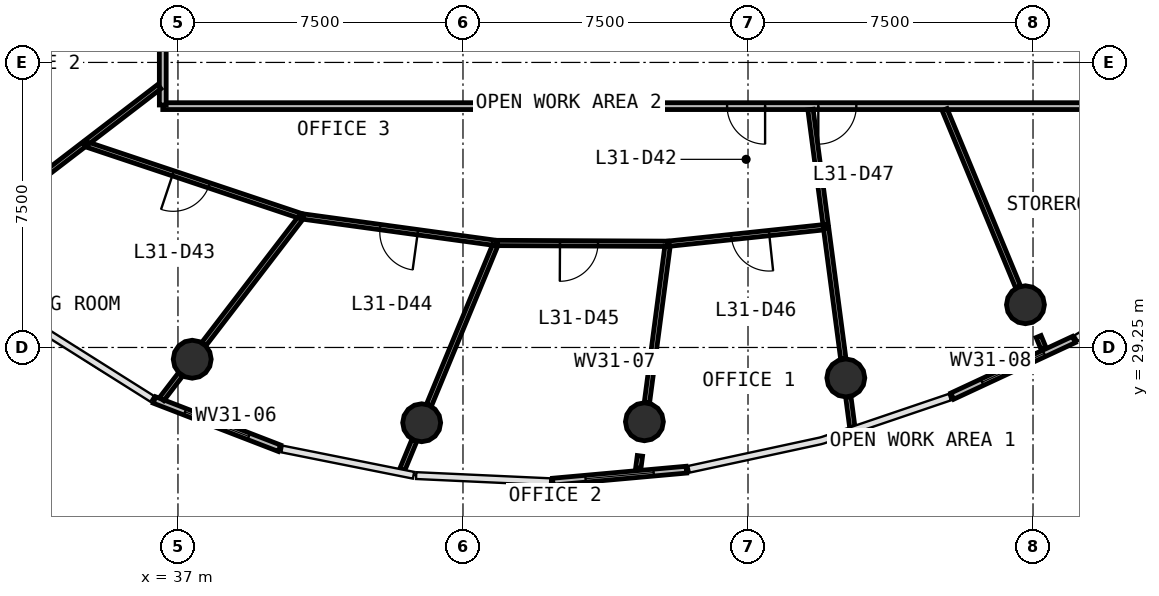
"""IFC4 building model, lengths in metres.
Left out: names, types, materials, properties, quantities, classifications, styles, units other than length and angle.
Written with IfcOpenShell. Run it as: python <this file> out.ifc"""

import sys

from ifc_helpers import new_model, si_unit, direction, frame, frame_2d, origin, origin_2d, place, context, subcontext, project, spatial, rectangle, circle, extrude, source, transform, mapped, element, fill, save


model = new_model("IFC4")
c1 = context("Model", 3, precision=1e-05, world=origin(), true_north=direction((0.0, 1.0)))
c2 = subcontext(c1, "Body", "Model", "MODEL_VIEW")
j1 = project(units=[si_unit("LENGTHUNIT", "METRE"), si_unit("PLANEANGLEUNIT", "RADIAN")], contexts=[c1])
p1 = place(None, origin())
s1 = spatial("IfcSite", under=j1, at=p1, CompositionType="ELEMENT")
p2 = place(p1, origin())
s2 = spatial("IfcBuilding", under=s1, at=p2, CompositionType="ELEMENT")
p3 = place(p2, frame((0.0, 0.0, 133.1)))
s3 = spatial("IfcBuildingStorey", under=s2, at=p3, CompositionType="ELEMENT", Elevation=133.1)
m1 = source(origin(), c2, "Body", "SweptSolid", [
    extrude(circle(Radius=0.5, at=origin_2d()), origin(), (0.0, 0.0, 1.0), 4.22),
])
for number, where, z_axis, x_axis in (
    (1, (37.375, 28.94, -0.32), (0.0, 0.0, 1.0), (1.0, 0.0, 0.0)),
    (2, (43.413, 27.269, -0.32), (0.0, 0.0, 1.0), (1.0, 0.0, 0.0)),
    (3, (49.274, 27.295, -0.32), (0.0, 0.0, 1.0), (1.0, 0.0, 0.0)),
    (4, (54.574, 28.449, -0.32), (0.0, 0.0, 1.0), (1.0, 0.0, 0.0)),
    (5, (59.301, 30.374, -0.32), (0.0, 0.0, 1.0), (1.0, 0.0, 0.0)),
):
    element("IfcColumn", number, at=place(p3, frame(where, z_axis=z_axis, x_axis=x_axis)), inside=s3, PredefinedType="COLUMN", context=c2, shape_type="MappedRepresentation", body=[
        mapped(m1, transform((0.0, 0.0, 0.0), scale=1.0)),
    ])
p4 = place(p3, frame((36.381, 27.869, 0.0), z_axis=(0.0, 0.0, 1.0), x_axis=(0.932854177958, -0.36025419174, 0.0)))
e6 = element("IfcWall", 6, at=p4, inside=s3, PredefinedType="STANDARD", context=c2, shape_type="SweptSolid", body=[
    extrude(rectangle(XDim=3.527, YDim=0.18, at=frame_2d((1.764, 0.0))), origin(), (0.0, 0.0, 1.0), 3.328),
])
p5 = place(p4, frame((0.864, 0.0, 0.9)))
e7 = element("IfcOpeningElement", 7, at=p5, cuts=e6, PredefinedType="OPENING", context=c2, shape_type="SweptSolid", body=[
    extrude(rectangle(XDim=1.8, YDim=2.1, at=frame_2d((0.9, 1.05))), frame((0.0, 0.1, 0.0), z_axis=(0.0, -1.0, 0.0), x_axis=(1.0, 0.0, 0.0)), (0.0, 0.0, 1.0), 0.2),
])
p6 = place(p3, frame((46.863, 25.719, 0.0), z_axis=(0.0, 0.0, 1.0), x_axis=(0.995987333175, 0.089494313529, 0.0)))
e8 = element("IfcWall", 8, at=p6, inside=s3, PredefinedType="STANDARD", context=c2, shape_type="SweptSolid", body=[
    extrude(rectangle(XDim=3.53, YDim=0.18, at=frame_2d((1.765, 0.0))), origin(), (0.0, 0.0, 1.0), 3.328),
])
p7 = place(p6, frame((0.865, 0.0, 0.9)))
e9 = element("IfcOpeningElement", 9, at=p7, cuts=e8, PredefinedType="OPENING", context=c2, shape_type="SweptSolid", body=[
    extrude(rectangle(XDim=1.8, YDim=2.1, at=frame_2d((0.9, 1.05))), frame((0.0, 0.1, 0.0), z_axis=(0.0, -1.0, 0.0), x_axis=(1.0, 0.0, 0.0)), (0.0, 0.0, 1.0), 0.2),
])
p8 = place(p3, frame((57.375, 27.969, 0.0), z_axis=(0.0, 0.0, 1.0), x_axis=(0.906604865337, 0.421980589776, 0.0)))
e10 = element("IfcWall", 10, at=p8, inside=s3, PredefinedType="STANDARD", context=c2, shape_type="SweptSolid", body=[
    extrude(rectangle(XDim=3.531, YDim=0.18, at=frame_2d((1.766, 0.0))), origin(), (0.0, 0.0, 1.0), 3.58),
])
p9 = place(p8, frame((0.865, 0.0, 0.9)))
e11 = element("IfcOpeningElement", 11, at=p9, cuts=e10, PredefinedType="OPENING", context=c2, shape_type="SweptSolid", body=[
    extrude(rectangle(XDim=1.8, YDim=2.1, at=frame_2d((0.9, 1.05))), frame((0.0, 0.1, 0.0), z_axis=(0.0, -1.0, 0.0), x_axis=(1.0, 0.0, 0.0)), (0.0, 0.0, 1.0), 0.2),
])
p10 = place(p3, frame((64.324, 26.292, 0.0), z_axis=(0.0, 0.0, 1.0), x_axis=(-0.895150902045, -0.445763235998, 0.0)))
e12 = element("IfcWall", 12, at=p10, inside=s3, PredefinedType="PARAPET", context=c2, shape_type="SweptSolid", body=[
    extrude(rectangle(XDim=5.86, YDim=0.2, at=frame_2d((2.93, 0.0))), origin(), (0.0, 0.0, 1.0), 1.1),
])
p11 = place(p3, frame((67.4, 35.6, 0.0), z_axis=(0.0, 0.0, 1.0), x_axis=(-1.0, 0.0, 0.0)))
e13 = element("IfcWall", 13, at=p11, inside=s3, PredefinedType="PARTITIONING", context=c2, shape_type="SweptSolid", body=[
    extrude(rectangle(XDim=30.8, YDim=0.18, at=frame_2d((15.4, 0.0))), origin(), (0.0, 0.0, 1.0), 2.88),
])
p12 = place(p11, frame((14.95, 0.0, 0.0)))
e14 = element("IfcOpeningElement", 14, at=p12, cuts=e13, PredefinedType="OPENING", context=c2, shape_type="SweptSolid", body=[
    extrude(rectangle(XDim=1.0, YDim=2.1, at=frame_2d((0.5, 1.05))), frame((0.0, 0.1, 0.0), z_axis=(0.0, -1.0, 0.0), x_axis=(1.0, 0.0, 0.0)), (0.0, 0.0, 1.0), 0.2),
])
p13 = place(p11, frame((12.55, 0.0, 0.0)))
e15 = element("IfcOpeningElement", 15, at=p13, cuts=e13, PredefinedType="OPENING", context=c2, shape_type="SweptSolid", body=[
    extrude(rectangle(XDim=1.0, YDim=2.1, at=frame_2d((0.5, 1.05))), frame((0.0, 0.1, 0.0), z_axis=(0.0, -1.0, 0.0), x_axis=(1.0, 0.0, 0.0)), (0.0, 0.0, 1.0), 0.2),
])
p14 = place(p3, frame((36.6, 35.63, 0.0), z_axis=(0.0, 0.0, 1.0), x_axis=(0.0, 1.0, 0.0)))
e16 = element("IfcWall", 16, at=p14, inside=s3, PredefinedType="PARTITIONING", context=c2, shape_type="SweptSolid", body=[
    extrude(rectangle(XDim=23.638, YDim=0.18, at=frame_2d((11.819, 0.0))), origin(), (0.0, 0.0, 1.0), 2.88),
])
p15 = place(p14, frame((11.387, 0.0, 0.0)))
e17 = element("IfcOpeningElement", 17, at=p15, cuts=e16, PredefinedType="OPENING", context=c2, shape_type="SweptSolid", body=[
    extrude(rectangle(XDim=1.0, YDim=2.1, at=frame_2d((0.5, 1.05))), frame((0.0, 0.1, 0.0), z_axis=(0.0, -1.0, 0.0), x_axis=(1.0, 0.0, 0.0)), (0.0, 0.0, 1.0), 0.2),
])
p16 = place(p14, frame((8.988, 0.0, 0.0)))
e18 = element("IfcOpeningElement", 18, at=p16, cuts=e16, PredefinedType="OPENING", context=c2, shape_type="SweptSolid", body=[
    extrude(rectangle(XDim=1.0, YDim=2.1, at=frame_2d((0.5, 1.05))), frame((0.0, 0.1, 0.0), z_axis=(0.0, -1.0, 0.0), x_axis=(1.0, 0.0, 0.0)), (0.0, 0.0, 1.0), 0.2),
])
p17 = place(p14, frame((4.587, 0.0, 0.0)))
e19 = element("IfcOpeningElement", 19, at=p17, cuts=e16, PredefinedType="OPENING", context=c2, shape_type="SweptSolid", body=[
    extrude(rectangle(XDim=1.0, YDim=2.1, at=frame_2d((0.5, 1.05))), frame((0.0, 0.1, 0.0), z_axis=(0.0, -1.0, 0.0), x_axis=(1.0, 0.0, 0.0)), (0.0, 0.0, 1.0), 0.2),
])
p18 = place(p3, frame((40.26, 32.7, 0.0), z_axis=(0.0, 0.0, 1.0), x_axis=(-0.94841131313, 0.317042554126, 0.0)))
e20 = element("IfcWall", 20, at=p18, inside=s3, PredefinedType="PARTITIONING", context=c2, shape_type="SweptSolid", body=[
    extrude(rectangle(XDim=6.022, YDim=0.14, at=frame_2d((3.011, 0.0))), origin(), (0.0, 0.0, 1.0), 2.88),
])
p19 = place(p18, frame((2.572, 0.0, 0.0)))
e21 = element("IfcOpeningElement", 21, at=p19, cuts=e20, PredefinedType="OPENING", context=c2, shape_type="SweptSolid", body=[
    extrude(rectangle(XDim=1.0, YDim=2.1, at=frame_2d((0.5, 1.05))), frame((0.0, 0.08, 0.0), z_axis=(0.0, -1.0, 0.0), x_axis=(1.0, 0.0, 0.0)), (0.0, 0.0, 1.0), 0.16),
])
p20 = place(p3, frame((45.372, 32.0, 0.0), z_axis=(0.0, 0.0, 1.0), x_axis=(-0.990747746033, 0.135716261849, 0.0)))
e22 = element("IfcWall", 22, at=p20, inside=s3, PredefinedType="PARTITIONING", context=c2, shape_type="SweptSolid", body=[
    extrude(rectangle(XDim=5.13, YDim=0.14, at=frame_2d((2.565, 0.0))), origin(), (0.0, 0.0, 1.0), 2.88),
])
p21 = place(p20, frame((2.08, 0.0, 0.0)))
e23 = element("IfcOpeningElement", 23, at=p21, cuts=e22, PredefinedType="OPENING", context=c2, shape_type="SweptSolid", body=[
    extrude(rectangle(XDim=1.0, YDim=2.1, at=frame_2d((0.5, 1.05))), frame((0.0, 0.08, 0.0), z_axis=(0.0, -1.0, 0.0), x_axis=(1.0, 0.0, 0.0)), (0.0, 0.0, 1.0), 0.16),
])
p22 = place(p3, frame((57.174, 35.51, 0.0), z_axis=(0.0, 0.0, 1.0), x_axis=(0.382690261322, -0.923876703835, 0.0)))
e24 = element("IfcWall", 24, at=p22, inside=s3, PredefinedType="PARTITIONING", context=c2, shape_type="SweptSolid", body=[
    extrude(rectangle(XDim=5.054, YDim=0.14, at=frame_2d((2.527, 0.0))), origin(), (0.0, 0.0, 1.0), 2.88),
])
p23 = place(p3, frame((45.345, 31.933, 0.0), z_axis=(0.0, 0.0, 1.0), x_axis=(-0.382695113469, -0.923874693953, 0.0)))
e25 = element("IfcWall", 25, at=p23, inside=s3, PredefinedType="PARTITIONING", context=c2, shape_type="SweptSolid", body=[
    extrude(rectangle(XDim=4.543, YDim=0.14, at=frame_2d((2.271, 0.0))), origin(), (0.0, 0.0, 1.0), 2.88),
])
p24 = place(p3, frame((49.891, 31.978, 0.0), z_axis=(0.0, 0.0, 1.0), x_axis=(-0.999988802497, 0.004732322988, 0.0)))
e26 = element("IfcWall", 26, at=p24, inside=s3, PredefinedType="PARTITIONING", context=c2, shape_type="SweptSolid", body=[
    extrude(rectangle(XDim=4.488, YDim=0.14, at=frame_2d((2.244, 0.0))), origin(), (0.0, 0.0, 1.0), 2.88),
])
p25 = place(p24, frame((1.838, 0.0, 0.0)))
e27 = element("IfcOpeningElement", 27, at=p25, cuts=e26, PredefinedType="OPENING", context=c2, shape_type="SweptSolid", body=[
    extrude(rectangle(XDim=1.0, YDim=2.1, at=frame_2d((0.5, 1.05))), frame((0.0, 0.08, 0.0), z_axis=(0.0, -1.0, 0.0), x_axis=(1.0, 0.0, 0.0)), (0.0, 0.0, 1.0), 0.16),
])
p26 = place(p3, frame((40.215, 32.641, 0.0), z_axis=(0.0, 0.0, 1.0), x_axis=(-0.608771541946, -0.793345580259, 0.0)))
e28 = element("IfcWall", 28, at=p26, inside=s3, PredefinedType="PARTITIONING", context=c2, shape_type="SweptSolid", body=[
    extrude(rectangle(XDim=4.16, YDim=0.14, at=frame_2d((2.08, 0.0))), origin(), (0.0, 0.0, 1.0), 2.88),
])
p27 = place(p3, frame((49.882, 31.908, 0.0), z_axis=(0.0, 0.0, 1.0), x_axis=(-0.130586952739, -0.991436860206, 0.0)))
e29 = element("IfcWall", 29, at=p27, inside=s3, PredefinedType="PARTITIONING", context=c2, shape_type="SweptSolid", body=[
    extrude(rectangle(XDim=4.149, YDim=0.14, at=frame_2d((2.074, 0.0))), origin(), (0.0, 0.0, 1.0), 2.88),
])
p28 = place(p3, frame((54.051, 32.419, 0.0), z_axis=(0.0, 0.0, 1.0), x_axis=(-0.994419782511, -0.105495479291, 0.0)))
e30 = element("IfcWall", 30, at=p28, inside=s3, PredefinedType="PARTITIONING", context=c2, shape_type="SweptSolid", body=[
    extrude(rectangle(XDim=4.154, YDim=0.14, at=frame_2d((2.077, 0.0))), origin(), (0.0, 0.0, 1.0), 2.88),
])
p29 = place(p28, frame((1.504, 0.0, 0.0)))
e31 = element("IfcOpeningElement", 31, at=p29, cuts=e30, PredefinedType="OPENING", context=c2, shape_type="SweptSolid", body=[
    extrude(rectangle(XDim=1.0, YDim=2.1, at=frame_2d((0.5, 1.05))), frame((0.0, 0.08, 0.0), z_axis=(0.0, -1.0, 0.0), x_axis=(1.0, 0.0, 0.0)), (0.0, 0.0, 1.0), 0.16),
])
p30 = place(p3, frame((54.055, 32.39, 0.0), z_axis=(0.0, 0.0, 1.0), x_axis=(0.130481806014, -0.991450703918, 0.0)))
e32 = element("IfcWall", 32, at=p30, inside=s3, PredefinedType="PARTITIONING", context=c2, shape_type="SweptSolid", body=[
    extrude(rectangle(XDim=3.471, YDim=0.14, at=frame_2d((1.735, 0.0))), origin(), (0.0, 0.0, 1.0), 2.88),
])
p31 = place(p3, frame((53.644, 35.51, 0.0), z_axis=(0.0, 0.0, 1.0), x_axis=(0.130520836254, -0.991445566485, 0.0)))
e33 = element("IfcWall", 33, at=p31, inside=s3, PredefinedType="PARTITIONING", context=c2, shape_type="SweptSolid", body=[
    extrude(rectangle(XDim=3.047, YDim=0.14, at=frame_2d((1.523, 0.0))), origin(), (0.0, 0.0, 1.0), 2.88),
])
p32 = place(p3, frame((36.51, 36.114, 0.0), z_axis=(0.0, 0.0, 1.0), x_axis=(-0.793375926436, -0.608731993041, 0.0)))
e34 = element("IfcWall", 34, at=p32, inside=s3, PredefinedType="PARTITIONING", context=c2, shape_type="SweptSolid", body=[
    extrude(rectangle(XDim=2.388, YDim=0.14, at=frame_2d((1.194, 0.0))), origin(), (0.0, 0.0, 1.0), 2.88),
])
p33 = place(p3, frame((34.525, 34.591, 0.0), z_axis=(0.0, 0.0, 1.0), x_axis=(-0.793361748198, -0.608750471455, 0.0)))
e35 = element("IfcWall", 35, at=p33, inside=s3, PredefinedType="PARTITIONING", context=c2, shape_type="SweptSolid", body=[
    extrude(rectangle(XDim=2.458, YDim=0.14, at=frame_2d((1.229, 0.0))), origin(), (0.0, 0.0, 1.0), 2.88),
])
p34 = place(p3, frame((43.22, 26.802, 0.0), z_axis=(0.0, 0.0, 1.0), x_axis=(-0.382550591972, -0.923934545615, 0.0)))
e36 = element("IfcWall", 36, at=p34, inside=s3, PredefinedType="PARTITIONING", context=c2, shape_type="SweptSolid", body=[
    extrude(rectangle(XDim=0.832, YDim=0.14, at=frame_2d((0.416, 0.0))), origin(), (0.0, 0.0, 1.0), 2.88),
])
p35 = place(p3, frame((49.156, 26.398, 0.0), z_axis=(0.0, 0.0, 1.0), x_axis=(-0.130240292618, -0.991482458836, 0.0)))
e37 = element("IfcWall", 37, at=p35, inside=s3, PredefinedType="PARTITIONING", context=c2, shape_type="SweptSolid", body=[
    extrude(rectangle(XDim=0.324, YDim=0.14, at=frame_2d((0.162, 0.0))), origin(), (0.0, 0.0, 1.0), 2.88),
])
p36 = place(p3, frame((37.068, 28.54, 0.0), z_axis=(0.0, 0.0, 1.0), x_axis=(-0.608796827704, -0.793326176663, 0.0)))
e38 = element("IfcWall", 38, at=p36, inside=s3, PredefinedType="PARTITIONING", context=c2, shape_type="SweptSolid", body=[
    extrude(rectangle(XDim=0.814, YDim=0.14, at=frame_2d((0.407, 0.0))), origin(), (0.0, 0.0, 1.0), 2.88),
])
p37 = place(p3, frame((54.64, 27.948, 0.0), z_axis=(0.0, 0.0, 1.0), x_axis=(0.130376080529, -0.991464612392, 0.0)))
e39 = element("IfcWall", 39, at=p37, inside=s3, PredefinedType="PARTITIONING", context=c2, shape_type="SweptSolid", body=[
    extrude(rectangle(XDim=0.805, YDim=0.14, at=frame_2d((0.403, 0.0))), origin(), (0.0, 0.0, 1.0), 2.88),
])
p38 = place(p3, frame((59.647, 29.538, 0.0), z_axis=(0.0, 0.0, 1.0), x_axis=(0.38265863017, -0.923889805527, 0.0)))
e40 = element("IfcWall", 40, at=p38, inside=s3, PredefinedType="PARTITIONING", context=c2, shape_type="SweptSolid", body=[
    extrude(rectangle(XDim=0.328, YDim=0.14, at=frame_2d((0.164, 0.0))), origin(), (0.0, 0.0, 1.0), 2.88),
])
m2 = source(origin(), c2, "Body", "SweptSolid", [
    extrude(rectangle(XDim=1.8, YDim=2.1, at=frame_2d((0.9, 1.05))), frame((0.0, 0.03, 0.0), z_axis=(0.0, -1.0, 0.0), x_axis=(1.0, 0.0, 0.0)), (0.0, 0.0, 1.0), 0.06),
])
p39 = place(p5, origin())
e41 = element("IfcWindow", 41, at=p39, inside=s3, PartitioningType="SINGLE_PANEL", PredefinedType="WINDOW", context=c2, shape_type="MappedRepresentation", body=[
    mapped(m2, transform((0.0, 0.0, 0.0), scale=1.0)),
])
fill(e7, e41)
p40 = place(p7, origin())
e42 = element("IfcWindow", 42, at=p40, inside=s3, PartitioningType="SINGLE_PANEL", PredefinedType="WINDOW", context=c2, shape_type="MappedRepresentation", body=[
    mapped(m2, transform((0.0, 0.0, 0.0), scale=1.0)),
])
fill(e9, e42)
p41 = place(p9, origin())
e43 = element("IfcWindow", 43, at=p41, inside=s3, PartitioningType="SINGLE_PANEL", PredefinedType="WINDOW", context=c2, shape_type="MappedRepresentation", body=[
    mapped(m2, transform((0.0, 0.0, 0.0), scale=1.0)),
])
fill(e11, e43)
m3 = source(origin(), c2, "Body", "SweptSolid", [
    extrude(rectangle(XDim=1.0, YDim=2.1, at=frame_2d((0.5, 1.05))), frame((0.0, 0.025, 0.0), z_axis=(0.0, -1.0, 0.0), x_axis=(1.0, 0.0, 0.0)), (0.0, 0.0, 1.0), 0.05),
])
p42 = place(p12, origin())
e44 = element("IfcDoor", 44, at=p42, inside=s3, OperationType="SINGLE_SWING_LEFT", PredefinedType="DOOR", context=c2, shape_type="MappedRepresentation", body=[
    mapped(m3, transform((0.0, 0.0, 0.0), scale=1.0)),
])
fill(e14, e44)
p43 = place(p19, origin())
e45 = element("IfcDoor", 45, at=p43, inside=s3, OperationType="SINGLE_SWING_RIGHT", PredefinedType="DOOR", context=c2, shape_type="MappedRepresentation", body=[
    mapped(m3, transform((0.0, 0.0, 0.0), scale=1.0)),
])
fill(e21, e45)
p44 = place(p21, origin())
e46 = element("IfcDoor", 46, at=p44, inside=s3, OperationType="SINGLE_SWING_LEFT", PredefinedType="DOOR", context=c2, shape_type="MappedRepresentation", body=[
    mapped(m3, transform((0.0, 0.0, 0.0), scale=1.0)),
])
fill(e23, e46)
p45 = place(p25, origin())
e47 = element("IfcDoor", 47, at=p45, inside=s3, OperationType="SINGLE_SWING_RIGHT", PredefinedType="DOOR", context=c2, shape_type="MappedRepresentation", body=[
    mapped(m3, transform((0.0, 0.0, 0.0), scale=1.0)),
])
fill(e27, e47)
p46 = place(p29, origin())
e48 = element("IfcDoor", 48, at=p46, inside=s3, OperationType="SINGLE_SWING_LEFT", PredefinedType="DOOR", context=c2, shape_type="MappedRepresentation", body=[
    mapped(m3, transform((0.0, 0.0, 0.0), scale=1.0)),
])
fill(e31, e48)
p47 = place(p13, origin())
e49 = element("IfcDoor", 49, at=p47, inside=s3, OperationType="SINGLE_SWING_RIGHT", PredefinedType="DOOR", context=c2, shape_type="MappedRepresentation", body=[
    mapped(m3, transform((0.0, 0.0, 0.0), scale=1.0)),
])
fill(e15, e49)
save(model, sys.argv[1])
